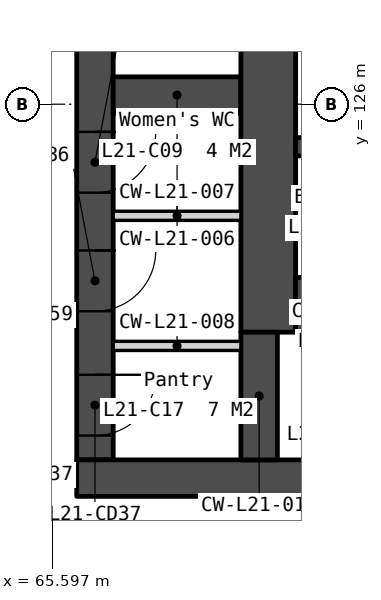
"""IFC4 building model, lengths in metres.
Left out: names, types, materials, properties, quantities, classifications, styles, units other than length and angle.
Written with IfcOpenShell. Run it as: python <this file> out.ifc"""

import sys

from ifc_helpers import new_model, si_unit, direction, frame, frame_2d, origin, place, context, subcontext, project, spatial, polyline, rectangle, outline, extrude, element, fill, save


model = new_model("IFC4")
c1 = context("Model", 3, precision=1e-05, world=origin(), true_north=direction((0.0, 1.0)))
c2 = subcontext(c1, "Body", "Model", "MODEL_VIEW")
j1 = project(units=[si_unit("LENGTHUNIT", "METRE"), si_unit("PLANEANGLEUNIT", "RADIAN")], contexts=[c1])
p1 = place(None, origin())
s1 = spatial("IfcSite", under=j1, at=p1, CompositionType="ELEMENT")
p2 = place(p1, origin())
s2 = spatial("IfcBuilding", under=s1, at=p2, CompositionType="ELEMENT")
p3 = place(p2, frame((0.0, 0.0, 88.8)))
s3 = spatial("IfcBuildingStorey", under=s2, at=p3, CompositionType="ELEMENT", Elevation=88.8)
p4 = place(p3, frame((66.3, 133.95, 0.0), z_axis=(0.0, 0.0, 1.0), x_axis=(0.0, -1.0, 0.0)))
e1 = element("IfcWall", 1, at=p4, inside=s3, PredefinedType="SOLIDWALL", context=c2, shape_type="SweptSolid", body=[
    extrude(rectangle(XDim=13.8, YDim=0.6, at=frame_2d((6.9, 0.0))), origin(), (0.0, 0.0, 1.0), 3.35),
])
p5 = place(p4, frame((0.6, 0.0, 0.0)))
e2 = element("IfcOpeningElement", 2, at=p5, cuts=e1, PredefinedType="OPENING", context=c2, shape_type="SweptSolid", body=[
    extrude(rectangle(XDim=1.1, YDim=2.1, at=frame_2d((0.55, 1.05))), frame((0.0, 0.31, 0.0), z_axis=(0.0, -1.0, 0.0), x_axis=(1.0, 0.0, 0.0)), (0.0, 0.0, 1.0), 0.62),
])
p6 = place(p4, frame((8.405, 0.0, 0.0)))
e3 = element("IfcOpeningElement", 3, at=p6, cuts=e1, PredefinedType="OPENING", context=c2, shape_type="SweptSolid", body=[
    extrude(rectangle(XDim=1.0, YDim=2.1, at=frame_2d((0.5, 1.05))), frame((0.0, 0.31, 0.0), z_axis=(0.0, -1.0, 0.0), x_axis=(1.0, 0.0, 0.0)), (0.0, 0.0, 1.0), 0.62),
])
p7 = place(p4, frame((10.355, 0.0, 0.0)))
e4 = element("IfcOpeningElement", 4, at=p7, cuts=e1, PredefinedType="OPENING", context=c2, shape_type="SweptSolid", body=[
    extrude(rectangle(XDim=1.0, YDim=2.1, at=frame_2d((0.5, 1.05))), frame((0.0, 0.31, 0.0), z_axis=(0.0, -1.0, 0.0), x_axis=(1.0, 0.0, 0.0)), (0.0, 0.0, 1.0), 0.62),
])
p8 = place(p4, frame((12.4, 0.0, 0.0)))
e5 = element("IfcOpeningElement", 5, at=p8, cuts=e1, PredefinedType="OPENING", context=c2, shape_type="SweptSolid", body=[
    extrude(rectangle(XDim=1.0, YDim=2.1, at=frame_2d((0.5, 1.05))), frame((0.0, 0.31, 0.0), z_axis=(0.0, -1.0, 0.0), x_axis=(1.0, 0.0, 0.0)), (0.0, 0.0, 1.0), 0.62),
])
p9 = place(p3, frame((66.0, 119.85, 0.0), z_axis=(0.0, 0.0, 1.0), x_axis=(1.0, 0.0, 0.0)))
e6 = element("IfcWall", 6, at=p9, inside=s3, PredefinedType="SOLIDWALL", context=c2, shape_type="SweptSolid", body=[
    extrude(rectangle(XDim=28.0, YDim=0.6, at=frame_2d((14.0, 0.0))), origin(), (0.0, 0.0, 1.0), 3.35),
])
p10 = place(p9, frame((6.825, 0.0, 0.0)))
e7 = element("IfcOpeningElement", 7, at=p10, cuts=e6, PredefinedType="OPENING", context=c2, shape_type="SweptSolid", body=[
    extrude(rectangle(XDim=1.8, YDim=2.1, at=frame_2d((0.9, 1.05))), frame((0.0, 0.31, 0.0), z_axis=(0.0, -1.0, 0.0), x_axis=(1.0, 0.0, 0.0)), (0.0, 0.0, 1.0), 0.62),
])
p11 = place(p9, frame((15.85, 0.0, 0.0)))
e8 = element("IfcOpeningElement", 8, at=p11, cuts=e6, PredefinedType="OPENING", context=c2, shape_type="SweptSolid", body=[
    extrude(rectangle(XDim=1.5, YDim=2.1, at=frame_2d((0.75, 1.05))), frame((0.0, 0.31, 0.0), z_axis=(0.0, -1.0, 0.0), x_axis=(1.0, 0.0, 0.0)), (0.0, 0.0, 1.0), 0.62),
])
p12 = place(p9, frame((19.375, 0.0, 0.0)))
e9 = element("IfcOpeningElement", 9, at=p12, cuts=e6, PredefinedType="OPENING", context=c2, shape_type="SweptSolid", body=[
    extrude(rectangle(XDim=1.8, YDim=2.1, at=frame_2d((0.9, 1.05))), frame((0.0, 0.31, 0.0), z_axis=(0.0, -1.0, 0.0), x_axis=(1.0, 0.0, 0.0)), (0.0, 0.0, 1.0), 0.62),
])
p13 = place(p9, frame((4.425, 0.0, 0.0)))
e10 = element("IfcOpeningElement", 10, at=p13, cuts=e6, PredefinedType="OPENING", context=c2, shape_type="SweptSolid", body=[
    extrude(rectangle(XDim=1.0, YDim=2.1, at=frame_2d((0.5, 1.05))), frame((0.0, 0.31, 0.0), z_axis=(0.0, -1.0, 0.0), x_axis=(1.0, 0.0, 0.0)), (0.0, 0.0, 1.0), 0.62),
])
p14 = place(p9, frame((9.783, 0.0, 0.0)))
e11 = element("IfcOpeningElement", 11, at=p14, cuts=e6, PredefinedType="OPENING", context=c2, shape_type="SweptSolid", body=[
    extrude(rectangle(XDim=1.0, YDim=2.1, at=frame_2d((0.5, 1.05))), frame((0.0, 0.31, 0.0), z_axis=(0.0, -1.0, 0.0), x_axis=(1.0, 0.0, 0.0)), (0.0, 0.0, 1.0), 0.62),
])
p15 = place(p9, frame((11.525, 0.0, 0.0)))
e12 = element("IfcOpeningElement", 12, at=p15, cuts=e6, PredefinedType="OPENING", context=c2, shape_type="SweptSolid", body=[
    extrude(rectangle(XDim=1.0, YDim=2.1, at=frame_2d((0.5, 1.05))), frame((0.0, 0.31, 0.0), z_axis=(0.0, -1.0, 0.0), x_axis=(1.0, 0.0, 0.0)), (0.0, 0.0, 1.0), 0.62),
])
p16 = place(p9, frame((13.658, 0.0, 0.0)))
e13 = element("IfcOpeningElement", 13, at=p16, cuts=e6, PredefinedType="OPENING", context=c2, shape_type="SweptSolid", body=[
    extrude(rectangle(XDim=1.0, YDim=2.1, at=frame_2d((0.5, 1.05))), frame((0.0, 0.31, 0.0), z_axis=(0.0, -1.0, 0.0), x_axis=(1.0, 0.0, 0.0)), (0.0, 0.0, 1.0), 0.62),
])
p17 = place(p9, frame((21.725, 0.0, 0.0)))
e14 = element("IfcOpeningElement", 14, at=p17, cuts=e6, PredefinedType="OPENING", context=c2, shape_type="SweptSolid", body=[
    extrude(rectangle(XDim=1.0, YDim=2.1, at=frame_2d((0.5, 1.05))), frame((0.0, 0.31, 0.0), z_axis=(0.0, -1.0, 0.0), x_axis=(1.0, 0.0, 0.0)), (0.0, 0.0, 1.0), 0.62),
])
p18 = place(p9, frame((23.425, 0.0, 0.0)))
e15 = element("IfcOpeningElement", 15, at=p18, cuts=e6, PredefinedType="OPENING", context=c2, shape_type="SweptSolid", body=[
    extrude(rectangle(XDim=1.0, YDim=2.1, at=frame_2d((0.5, 1.05))), frame((0.0, 0.31, 0.0), z_axis=(0.0, -1.0, 0.0), x_axis=(1.0, 0.0, 0.0)), (0.0, 0.0, 1.0), 0.62),
])
p19 = place(p3, frame((66.6, 126.15, 0.0), z_axis=(0.0, 0.0, 1.0), x_axis=(1.0, 0.0, 0.0)))
e16 = element("IfcWall", 16, at=p19, inside=s3, PredefinedType="SOLIDWALL", context=c2, shape_type="SweptSolid", body=[
    extrude(rectangle(XDim=2.1, YDim=0.6, at=frame_2d((1.05, 0.0))), origin(), (0.0, 0.0, 1.0), 3.35),
])
for number, where, z_axis, x_axis in (
    (17, (66.6, 124.165, 0.0), (0.0, 0.0, 1.0), (1.0, 0.0, 0.0)),
    (18, (66.6, 122.025, 0.0), (0.0, 0.0, 1.0), (1.0, 0.0, 0.0)),
):
    element("IfcWall", number, at=place(p3, frame(where, z_axis=z_axis, x_axis=x_axis)), inside=s3, PredefinedType="PARTITIONING", context=c2, shape_type="SweptSolid", body=[
        extrude(rectangle(XDim=2.1, YDim=0.15, at=frame_2d((1.05, 0.0))), origin(), (0.0, 0.0, 1.0), 3.35),
    ])
p20 = place(p3, frame((69.15, 133.95, 0.0), z_axis=(0.0, 0.0, 1.0), x_axis=(0.0, -1.0, 0.0)))
e19 = element("IfcWall", 19, at=p20, inside=s3, PredefinedType="SOLIDWALL", context=c2, shape_type="SweptSolid", body=[
    extrude(rectangle(XDim=11.7, YDim=0.9, at=frame_2d((5.85, 0.0))), origin(), (0.0, 0.0, 1.0), 3.35),
])
p21 = place(p3, frame((69.0, 122.25, 0.0), z_axis=(0.0, 0.0, 1.0), x_axis=(0.0, -1.0, 0.0)))
e20 = element("IfcWall", 20, at=p21, inside=s3, PredefinedType="SOLIDWALL", context=c2, shape_type="SweptSolid", body=[
    extrude(rectangle(XDim=2.1, YDim=0.6, at=frame_2d((1.05, 0.0))), origin(), (0.0, 0.0, 1.0), 3.35),
])
p22 = place(p3, frame((69.6, 125.3, 0.0), z_axis=(0.0, 0.0, 1.0), x_axis=(1.0, 0.0, 0.0)))
e21 = element("IfcWall", 21, at=p22, inside=s3, PredefinedType="SOLIDWALL", context=c2, shape_type="SweptSolid", body=[
    extrude(rectangle(XDim=2.55, YDim=0.3, at=frame_2d((1.275, 0.0))), origin(), (0.0, 0.0, 1.0), 3.35),
])
p23 = place(p3, frame((69.6, 122.7, 0.0), z_axis=(0.0, 0.0, 1.0), x_axis=(1.0, 0.0, 0.0)))
e22 = element("IfcWall", 22, at=p23, inside=s3, PredefinedType="SOLIDWALL", context=c2, shape_type="SweptSolid", body=[
    extrude(rectangle(XDim=2.55, YDim=0.9, at=frame_2d((1.275, 0.0))), origin(), (0.0, 0.0, 1.0), 3.35),
])
p24 = place(p3, frame((56.073, 130.263, -0.15), z_axis=(0.0, 0.0, 1.0), x_axis=(0.500000478905, -0.866025127289, 0.0)))
e23 = element("IfcWall", 23, at=p24, inside=s3, PredefinedType="SOLIDWALL", context=c2, shape_type="SweptSolid", body=[
    extrude(outline(polyline([(42.643, 0.0), (42.643, 3.5), (0.0, 3.5), (0.0, 0.0), (42.643, 0.0)])), frame((0.0, 0.225, 0.0), z_axis=(0.0, -1.0, 0.0), x_axis=(1.0, 0.0, 0.0)), (0.0, 0.0, 1.0), 0.45),
])
p25 = place(p24, frame((0.72, 0.0, 1.05)))
e24 = element("IfcOpeningElement", 24, at=p25, cuts=e23, PredefinedType="OPENING", context=c2, shape_type="SweptSolid", body=[
    extrude(rectangle(XDim=1.2, YDim=1.5, at=frame_2d((0.6, 0.75))), frame((0.0, 0.235, 0.0), z_axis=(0.0, -1.0, 0.0), x_axis=(1.0, 0.0, 0.0)), (0.0, 0.0, 1.0), 0.47),
])
p26 = place(p24, frame((7.079, 0.0, 1.05)))
e25 = element("IfcOpeningElement", 25, at=p26, cuts=e23, PredefinedType="OPENING", context=c2, shape_type="SweptSolid", body=[
    extrude(rectangle(XDim=1.2, YDim=1.5, at=frame_2d((0.6, 0.75))), frame((0.0, 0.235, 0.0), z_axis=(0.0, -1.0, 0.0), x_axis=(1.0, 0.0, 0.0)), (0.0, 0.0, 1.0), 0.47),
])
p27 = place(p24, frame((8.779, 0.0, 1.05)))
e26 = element("IfcOpeningElement", 26, at=p27, cuts=e23, PredefinedType="OPENING", context=c2, shape_type="SweptSolid", body=[
    extrude(rectangle(XDim=1.2, YDim=1.5, at=frame_2d((0.6, 0.75))), frame((0.0, 0.235, 0.0), z_axis=(0.0, -1.0, 0.0), x_axis=(1.0, 0.0, 0.0)), (0.0, 0.0, 1.0), 0.47),
])
p28 = place(p24, frame((15.607, 0.0, 1.05)))
e27 = element("IfcOpeningElement", 27, at=p28, cuts=e23, PredefinedType="OPENING", context=c2, shape_type="SweptSolid", body=[
    extrude(rectangle(XDim=1.2, YDim=1.5, at=frame_2d((0.6, 0.75))), frame((0.0, 0.235, 0.0), z_axis=(0.0, -1.0, 0.0), x_axis=(1.0, 0.0, 0.0)), (0.0, 0.0, 1.0), 0.47),
])
p29 = place(p24, frame((17.307, 0.0, 1.05)))
e28 = element("IfcOpeningElement", 28, at=p29, cuts=e23, PredefinedType="OPENING", context=c2, shape_type="SweptSolid", body=[
    extrude(rectangle(XDim=1.2, YDim=1.5, at=frame_2d((0.6, 0.75))), frame((0.0, 0.235, 0.0), z_axis=(0.0, -1.0, 0.0), x_axis=(1.0, 0.0, 0.0)), (0.0, 0.0, 1.0), 0.47),
])
p30 = place(p24, frame((24.136, 0.0, 1.05)))
e29 = element("IfcOpeningElement", 29, at=p30, cuts=e23, PredefinedType="OPENING", context=c2, shape_type="SweptSolid", body=[
    extrude(rectangle(XDim=1.2, YDim=1.5, at=frame_2d((0.6, 0.75))), frame((0.0, 0.235, 0.0), z_axis=(0.0, -1.0, 0.0), x_axis=(1.0, 0.0, 0.0)), (0.0, 0.0, 1.0), 0.47),
])
p31 = place(p24, frame((25.836, 0.0, 1.05)))
e30 = element("IfcOpeningElement", 30, at=p31, cuts=e23, PredefinedType="OPENING", context=c2, shape_type="SweptSolid", body=[
    extrude(rectangle(XDim=1.2, YDim=1.5, at=frame_2d((0.6, 0.75))), frame((0.0, 0.235, 0.0), z_axis=(0.0, -1.0, 0.0), x_axis=(1.0, 0.0, 0.0)), (0.0, 0.0, 1.0), 0.47),
])
p32 = place(p24, frame((32.665, 0.0, 1.05)))
e31 = element("IfcOpeningElement", 31, at=p32, cuts=e23, PredefinedType="OPENING", context=c2, shape_type="SweptSolid", body=[
    extrude(rectangle(XDim=1.2, YDim=1.5, at=frame_2d((0.6, 0.75))), frame((0.0, 0.235, 0.0), z_axis=(0.0, -1.0, 0.0), x_axis=(1.0, 0.0, 0.0)), (0.0, 0.0, 1.0), 0.47),
])
p33 = place(p24, frame((34.365, 0.0, 1.05)))
e32 = element("IfcOpeningElement", 32, at=p33, cuts=e23, PredefinedType="OPENING", context=c2, shape_type="SweptSolid", body=[
    extrude(rectangle(XDim=1.2, YDim=1.5, at=frame_2d((0.6, 0.75))), frame((0.0, 0.235, 0.0), z_axis=(0.0, -1.0, 0.0), x_axis=(1.0, 0.0, 0.0)), (0.0, 0.0, 1.0), 0.47),
])
p34 = place(p24, frame((40.722, 0.0, 1.05)))
e33 = element("IfcOpeningElement", 33, at=p34, cuts=e23, PredefinedType="OPENING", context=c2, shape_type="SweptSolid", body=[
    extrude(rectangle(XDim=1.2, YDim=1.5, at=frame_2d((0.6, 0.75))), frame((0.0, 0.235, 0.0), z_axis=(0.0, -1.0, 0.0), x_axis=(1.0, 0.0, 0.0)), (0.0, 0.0, 1.0), 0.47),
])
p35 = place(p6, origin())
e34 = element("IfcDoor", 34, at=p35, inside=s3, OperationType="SINGLE_SWING_LEFT", PredefinedType="DOOR", context=c2, shape_type="SweptSolid", body=[
    extrude(rectangle(XDim=1.0, YDim=2.1, at=frame_2d((0.5, 1.05))), frame((0.0, 0.025, 0.0), z_axis=(0.0, -1.0, 0.0), x_axis=(1.0, 0.0, 0.0)), (0.0, 0.0, 1.0), 0.05),
])
fill(e3, e34)
p36 = place(p7, origin())
e35 = element("IfcDoor", 35, at=p36, inside=s3, OperationType="SINGLE_SWING_LEFT", PredefinedType="DOOR", context=c2, shape_type="SweptSolid", body=[
    extrude(rectangle(XDim=1.0, YDim=2.1, at=frame_2d((0.5, 1.05))), frame((0.0, 0.025, 0.0), z_axis=(0.0, -1.0, 0.0), x_axis=(1.0, 0.0, 0.0)), (0.0, 0.0, 1.0), 0.05),
])
fill(e4, e35)
p37 = place(p8, origin())
e36 = element("IfcDoor", 36, at=p37, inside=s3, OperationType="SINGLE_SWING_LEFT", PredefinedType="DOOR", context=c2, shape_type="SweptSolid", body=[
    extrude(rectangle(XDim=1.0, YDim=2.1, at=frame_2d((0.5, 1.05))), frame((0.0, 0.025, 0.0), z_axis=(0.0, -1.0, 0.0), x_axis=(1.0, 0.0, 0.0)), (0.0, 0.0, 1.0), 0.05),
])
fill(e5, e36)
save(model, sys.argv[1])
